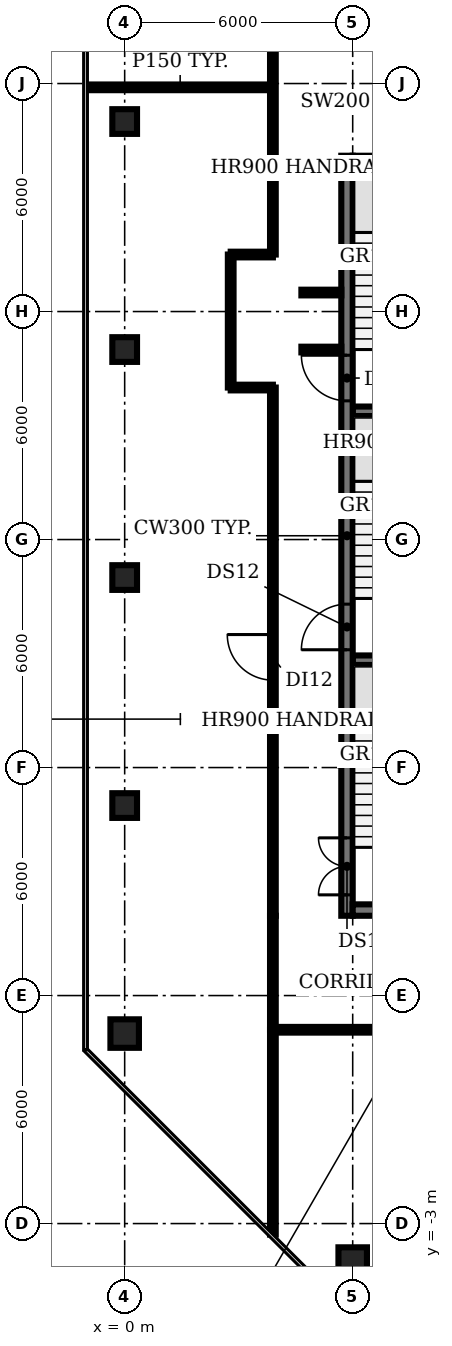
"""IFC4 building model, lengths in metres.
Left out: names, types, materials, properties, quantities, classifications, styles, units other than length and angle.
Written with IfcOpenShell. Run it as: python <this file> out.ifc"""

import sys

from ifc_helpers import new_model, si_unit, direction, frame, frame_2d, origin, origin_2d, place, context, subcontext, project, spatial, rectangle, circle, extrude, element, fill, save


model = new_model("IFC4")
c1 = context("Model", 3, precision=1e-05, world=origin(), true_north=direction((0.0, 1.0)))
c2 = subcontext(c1, "Body", "Model", "MODEL_VIEW")
j1 = project(units=[si_unit("LENGTHUNIT", "METRE"), si_unit("PLANEANGLEUNIT", "RADIAN")], contexts=[c1])
p1 = place(None, origin())
s1 = spatial("IfcSite", under=j1, at=p1, CompositionType="ELEMENT")
p2 = place(p1, origin())
s2 = spatial("IfcBuilding", under=s1, at=p2, CompositionType="ELEMENT")
p3 = place(p2, frame((0.0, 0.0, 314.6)))
s3 = spatial("IfcBuildingStorey", under=s2, at=p3, CompositionType="ELEMENT", Elevation=314.6)
p4 = place(p3, frame((0.0, 2.0, 0.0), z_axis=(0.0, 0.0, 1.0), x_axis=(1.0, 0.0, 0.0)))
e1 = element("IfcColumn", 1, at=p4, inside=s3, PredefinedType="COLUMN", context=c2, shape_type="SweptSolid", body=[
    extrude(circle(Radius=0.375, at=origin_2d()), origin(), (0.0, 0.0, 1.0), 3.9),
])
for number, where, z_axis, x_axis in (
    (2, (0.0, 8.0, 0.0), (0.0, 0.0, 1.0), (1.0, 0.0, 0.0)),
    (3, (0.0, 14.0, 0.0), (0.0, 0.0, 1.0), (1.0, 0.0, 0.0)),
    (4, (0.0, 20.0, 0.0), (0.0, 0.0, 1.0), (1.0, 0.0, 0.0)),
    (5, (0.0, 26.0, 0.0), (0.0, 0.0, 1.0), (1.0, 0.0, 0.0)),
):
    element("IfcColumn", number, at=place(p3, frame(where, z_axis=z_axis, x_axis=x_axis)), inside=s3, PredefinedType="COLUMN", context=c2, shape_type="SweptSolid", body=[
        extrude(rectangle(XDim=0.65, YDim=0.65, at=origin_2d()), origin(), (0.0, 0.0, 1.0), 3.9),
    ])
p5 = place(p3, frame((6.0, -4.0, 0.0), z_axis=(0.0, 0.0, 1.0), x_axis=(1.0, 0.0, 0.0)))
e6 = element("IfcColumn", 6, at=p5, inside=s3, PredefinedType="COLUMN", context=c2, shape_type="SweptSolid", body=[
    extrude(circle(Radius=0.375, at=origin_2d()), origin(), (0.0, 0.0, 1.0), 3.9),
])
for number, where, z_axis, x_axis in (
    (7, (6.0, 11.825, 0.0), (0.0, 0.0, 1.0), (1.0, 0.0, 0.0)),
    (8, (6.0, 18.375, 0.0), (0.0, 0.0, 1.0), (1.0, 0.0, 0.0)),
):
    element("IfcWall", number, at=place(p3, frame(where, z_axis=z_axis, x_axis=x_axis)), inside=s3, PredefinedType="SHEAR", context=c2, shape_type="SweptSolid", body=[
        extrude(rectangle(XDim=3.15, YDim=0.25, at=frame_2d((1.575, 0.0))), origin(), (0.0, 0.0, 1.0), 3.9),
    ])
p6 = place(p3, frame((5.85, 5.1, 0.0), z_axis=(0.0, 0.0, 1.0), x_axis=(0.0, 1.0, 0.0)))
e9 = element("IfcWall", 9, at=p6, inside=s3, PredefinedType="SHEAR", context=c2, shape_type="SweptSolid", body=[
    extrude(rectangle(XDim=20.0, YDim=0.3, at=frame_2d((10.0, 0.0))), origin(), (0.0, 0.0, 1.0), 3.9),
])
p7 = place(p6, frame((0.55, 0.0, 0.0)))
e10 = element("IfcOpeningElement", 10, at=p7, cuts=e9, PredefinedType="OPENING", context=c2, shape_type="SweptSolid", body=[
    extrude(rectangle(XDim=1.5, YDim=2.1, at=frame_2d((0.75, 1.05))), frame((0.0, 0.16, 0.0), z_axis=(0.0, -1.0, 0.0), x_axis=(1.0, 0.0, 0.0)), (0.0, 0.0, 1.0), 0.32),
])
p8 = place(p6, frame((7.0, 0.0, 0.0)))
e11 = element("IfcOpeningElement", 11, at=p8, cuts=e9, PredefinedType="OPENING", context=c2, shape_type="SweptSolid", body=[
    extrude(rectangle(XDim=1.2, YDim=2.1, at=frame_2d((0.6, 1.05))), frame((0.0, 0.16, 0.0), z_axis=(0.0, -1.0, 0.0), x_axis=(1.0, 0.0, 0.0)), (0.0, 0.0, 1.0), 0.32),
])
p9 = place(p6, frame((13.55, 0.0, 0.0)))
e12 = element("IfcOpeningElement", 12, at=p9, cuts=e9, PredefinedType="OPENING", context=c2, shape_type="SweptSolid", body=[
    extrude(rectangle(XDim=1.2, YDim=2.1, at=frame_2d((0.6, 1.05))), frame((0.0, 0.16, 0.0), z_axis=(0.0, -1.0, 0.0), x_axis=(1.0, 0.0, 0.0)), (0.0, 0.0, 1.0), 0.32),
])
p10 = place(p3, frame((24.0, 5.25, 0.0), z_axis=(0.0, 0.0, 1.0), x_axis=(-1.0, 0.0, 0.0)))
e13 = element("IfcWall", 13, at=p10, inside=s3, PredefinedType="SHEAR", context=c2, shape_type="SweptSolid", body=[
    extrude(rectangle(XDim=18.0, YDim=0.3, at=frame_2d((9.0, 0.0))), origin(), (0.0, 0.0, 1.0), 3.9),
])
p11 = place(p10, frame((13.0, 0.0, 0.0)))
e14 = element("IfcOpeningElement", 14, at=p11, cuts=e13, PredefinedType="OPENING", context=c2, shape_type="SweptSolid", body=[
    extrude(rectangle(XDim=1.2, YDim=2.1, at=frame_2d((0.6, 1.05))), frame((0.0, 0.16, 0.0), z_axis=(0.0, -1.0, 0.0), x_axis=(1.0, 0.0, 0.0)), (0.0, 0.0, 1.0), 0.32),
])
p12 = place(p10, frame((4.9, 0.0, 0.0)))
e15 = element("IfcOpeningElement", 15, at=p12, cuts=e13, PredefinedType="OPENING", context=c2, shape_type="SweptSolid", body=[
    extrude(rectangle(XDim=1.0, YDim=2.1, at=frame_2d((0.5, 1.05))), frame((0.0, 0.16, 0.0), z_axis=(0.0, -1.0, 0.0), x_axis=(1.0, 0.0, 0.0)), (0.0, 0.0, 1.0), 0.32),
])
p13 = place(p3, frame((6.0, 24.95, 0.0), z_axis=(0.0, 0.0, 1.0), x_axis=(1.0, 0.0, 0.0)))
e16 = element("IfcWall", 16, at=p13, inside=s3, PredefinedType="SHEAR", context=c2, shape_type="SweptSolid", body=[
    extrude(rectangle(XDim=18.0, YDim=0.3, at=frame_2d((9.0, 0.0))), origin(), (0.0, 0.0, 1.0), 3.9),
])
p14 = place(p3, frame((-0.98, 26.9, 0.0), z_axis=(0.0, 0.0, 1.0), x_axis=(1.0, 0.0, 0.0)))
e17 = element("IfcWall", 17, at=p14, inside=s3, PredefinedType="PARTITIONING", context=c2, shape_type="SweptSolid", body=[
    extrude(rectangle(XDim=4.88, YDim=0.15, at=frame_2d((2.44, 0.0))), origin(), (0.0, 0.0, 1.0), 2.95),
])
p15 = place(p3, frame((2.79, 19.0, 0.0), z_axis=(0.0, 0.0, 1.0), x_axis=(0.0, 1.0, 0.0)))
e18 = element("IfcWall", 18, at=p15, inside=s3, PredefinedType="PARTITIONING", context=c2, shape_type="SweptSolid", body=[
    extrude(rectangle(XDim=3.5, YDim=0.15, at=frame_2d((1.75, 0.0))), origin(), (0.0, 0.0, 1.0), 2.95),
])
for number, where, z_axis, x_axis in (
    (19, (2.79, 19.0, 0.0), (0.0, 0.0, 1.0), (1.0, 0.0, 0.0)),
    (20, (2.79, 22.5, 0.0), (0.0, 0.0, 1.0), (1.0, 0.0, 0.0)),
):
    element("IfcWall", number, at=place(p3, frame(where, z_axis=z_axis, x_axis=x_axis)), inside=s3, PredefinedType="PARTITIONING", context=c2, shape_type="SweptSolid", body=[
        extrude(rectangle(XDim=1.11, YDim=0.15, at=frame_2d((0.555, 0.0))), origin(), (0.0, 0.0, 1.0), 2.95),
    ])
p16 = place(p3, frame((3.9, -3.29, 0.0), z_axis=(0.0, 0.0, 1.0), x_axis=(0.0, 1.0, 0.0)))
e21 = element("IfcWall", 21, at=p16, inside=s3, PredefinedType="PARTITIONING", context=c2, shape_type="SweptSolid", body=[
    extrude(rectangle(XDim=5.39, YDim=0.15, at=frame_2d((2.695, 0.0))), origin(), (0.0, 0.0, 1.0), 2.95),
])
p17 = place(p3, frame((3.9, 2.1, 0.0), z_axis=(0.0, 0.0, 1.0), x_axis=(0.0, 1.0, 0.0)))
e22 = element("IfcWall", 22, at=p17, inside=s3, PredefinedType="PARTITIONING", context=c2, shape_type="SweptSolid", body=[
    extrude(rectangle(XDim=3.0, YDim=0.15, at=frame_2d((1.5, 0.0))), origin(), (0.0, 0.0, 1.0), 2.95),
])
p18 = place(p3, frame((3.9, 5.1, 0.0), z_axis=(0.0, 0.0, 1.0), x_axis=(0.0, 1.0, 0.0)))
e23 = element("IfcWall", 23, at=p18, inside=s3, PredefinedType="PARTITIONING", context=c2, shape_type="SweptSolid", body=[
    extrude(rectangle(XDim=13.9, YDim=0.15, at=frame_2d((6.95, 0.0))), origin(), (0.0, 0.0, 1.0), 2.95),
])
p19 = place(p18, frame((6.2, 0.0, 0.0)))
e24 = element("IfcOpeningElement", 24, at=p19, cuts=e23, PredefinedType="OPENING", context=c2, shape_type="SweptSolid", body=[
    extrude(rectangle(XDim=1.2, YDim=2.1, at=frame_2d((0.6, 1.05))), frame((0.0, 0.085, 0.0), z_axis=(0.0, -1.0, 0.0), x_axis=(1.0, 0.0, 0.0)), (0.0, 0.0, 1.0), 0.17),
])
p20 = place(p3, frame((3.9, 22.5, 0.0), z_axis=(0.0, 0.0, 1.0), x_axis=(0.0, 1.0, 0.0)))
e25 = element("IfcWall", 25, at=p20, inside=s3, PredefinedType="PARTITIONING", context=c2, shape_type="SweptSolid", body=[
    extrude(rectangle(XDim=5.6, YDim=0.15, at=frame_2d((2.8, 0.0))), origin(), (0.0, 0.0, 1.0), 2.95),
])
for number, where, z_axis, x_axis in (
    (26, (4.65, 20.0, 0.0), (0.0, 0.0, 1.0), (1.0, 0.0, 0.0)),
    (27, (4.65, 21.5, 0.0), (0.0, 0.0, 1.0), (1.0, 0.0, 0.0)),
):
    element("IfcWall", number, at=place(p3, frame(where, z_axis=z_axis, x_axis=x_axis)), inside=s3, PredefinedType="PARTITIONING", context=c2, shape_type="SweptSolid", body=[
        extrude(rectangle(XDim=1.05, YDim=0.15, at=frame_2d((0.525, 0.0))), origin(), (0.0, 0.0, 1.0), 2.95),
    ])
p21 = place(p3, frame((26.1, 2.1, 0.0), z_axis=(0.0, 0.0, 1.0), x_axis=(-1.0, 0.0, 0.0)))
e28 = element("IfcWall", 28, at=p21, inside=s3, PredefinedType="PARTITIONING", context=c2, shape_type="SweptSolid", body=[
    extrude(rectangle(XDim=22.2, YDim=0.15, at=frame_2d((11.1, 0.0))), origin(), (0.0, 0.0, 1.0), 2.95),
])
p22 = place(p21, frame((10.6, 0.0, 0.0)))
e29 = element("IfcOpeningElement", 29, at=p22, cuts=e28, PredefinedType="OPENING", context=c2, shape_type="SweptSolid", body=[
    extrude(rectangle(XDim=1.2, YDim=2.1, at=frame_2d((0.6, 1.05))), frame((0.0, 0.085, 0.0), z_axis=(0.0, -1.0, 0.0), x_axis=(1.0, 0.0, 0.0)), (0.0, 0.0, 1.0), 0.17),
])
p23 = place(p7, origin())
e30 = element("IfcDoor", 30, at=p23, inside=s3, OperationType="DOUBLE_DOOR_SINGLE_SWING", PredefinedType="DOOR", context=c2, shape_type="SweptSolid", body=[
    extrude(rectangle(XDim=1.5, YDim=2.1, at=frame_2d((0.75, 1.05))), frame((0.0, 0.025, 0.0), z_axis=(0.0, -1.0, 0.0), x_axis=(1.0, 0.0, 0.0)), (0.0, 0.0, 1.0), 0.05),
])
fill(e10, e30)
p24 = place(p8, origin())
e31 = element("IfcDoor", 31, at=p24, inside=s3, OperationType="SINGLE_SWING_LEFT", PredefinedType="DOOR", context=c2, shape_type="SweptSolid", body=[
    extrude(rectangle(XDim=1.2, YDim=2.1, at=frame_2d((0.6, 1.05))), frame((0.0, 0.025, 0.0), z_axis=(0.0, -1.0, 0.0), x_axis=(1.0, 0.0, 0.0)), (0.0, 0.0, 1.0), 0.05),
])
fill(e11, e31)
p25 = place(p9, origin())
e32 = element("IfcDoor", 32, at=p25, inside=s3, OperationType="SINGLE_SWING_RIGHT", PredefinedType="DOOR", context=c2, shape_type="SweptSolid", body=[
    extrude(rectangle(XDim=1.2, YDim=2.1, at=frame_2d((0.6, 1.05))), frame((0.0, 0.025, 0.0), z_axis=(0.0, -1.0, 0.0), x_axis=(1.0, 0.0, 0.0)), (0.0, 0.0, 1.0), 0.05),
])
fill(e12, e32)
p26 = place(p19, origin())
e33 = element("IfcDoor", 33, at=p26, inside=s3, OperationType="SINGLE_SWING_RIGHT", PredefinedType="DOOR", context=c2, shape_type="SweptSolid", body=[
    extrude(rectangle(XDim=1.2, YDim=2.1, at=frame_2d((0.6, 1.05))), frame((0.0, 0.025, 0.0), z_axis=(0.0, -1.0, 0.0), x_axis=(1.0, 0.0, 0.0)), (0.0, 0.0, 1.0), 0.05),
])
fill(e24, e33)
save(model, sys.argv[1])
